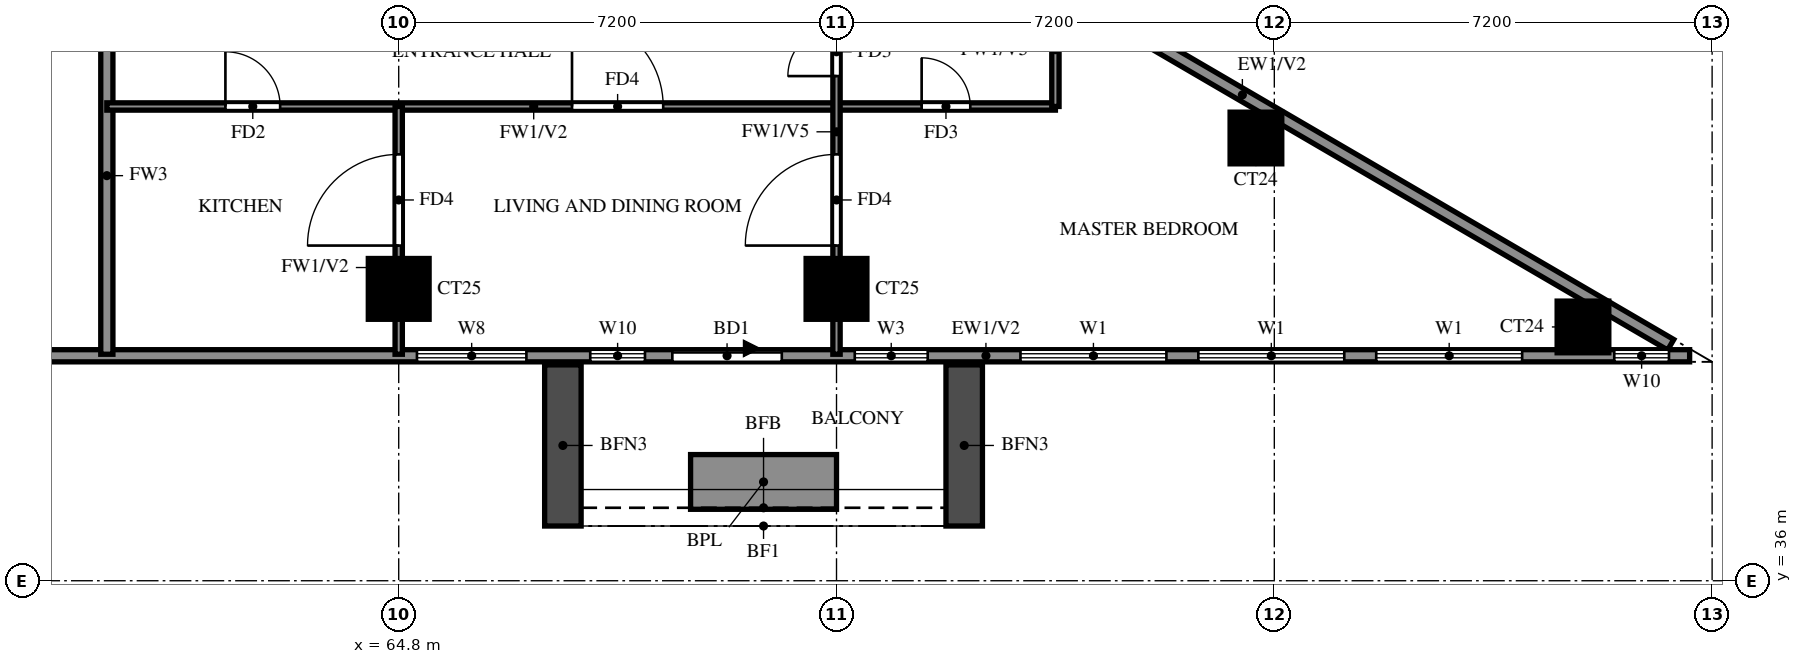
"""IFC4 building model, lengths in metres.
Left out: names, types, materials, properties, quantities, classifications, styles, units other than length and angle.
Written with IfcOpenShell. Run it as: python <this file> out.ifc"""

import sys

from ifc_helpers import new_model, si_unit, direction, frame, frame_2d, origin, origin_2d, place, context, subcontext, project, spatial, rectangle, extrude, source, transform, mapped, element, fill, save


model = new_model("IFC4")
c1 = context("Model", 3, precision=1e-05, world=origin(), true_north=direction((0.0, 1.0)))
c2 = subcontext(c1, "Body", "Model", "MODEL_VIEW")
j1 = project(units=[si_unit("LENGTHUNIT", "METRE"), si_unit("PLANEANGLEUNIT", "RADIAN")], contexts=[c1])
p1 = place(None, origin())
s1 = spatial("IfcSite", under=j1, at=p1, CompositionType="ELEMENT")
p2 = place(p1, origin())
s2 = spatial("IfcBuilding", under=s1, at=p2, CompositionType="ELEMENT")
p3 = place(p2, frame((0.0, 0.0, 143.0)))
s3 = spatial("IfcBuildingStorey", under=s2, at=p3, CompositionType="ELEMENT", Elevation=143.0)
m1 = source(origin(), c2, "Body", "SweptSolid", [
    extrude(rectangle(XDim=0.85, YDim=0.85, at=origin_2d()), origin(), (0.0, 0.0, 1.0), 3.2),
])
p4 = place(p3, frame((84.276, 40.174, 0.0), z_axis=(0.0, 0.0, 1.0), x_axis=(1.0, 0.0, 0.0)))
e1 = element("IfcColumn", 1, at=p4, inside=s3, PredefinedType="COLUMN", context=c2, shape_type="MappedRepresentation", body=[
    mapped(m1, transform((0.0, 0.0, 0.0))),
])
m2 = source(origin(), c2, "Body", "SweptSolid", [
    extrude(rectangle(XDim=1.0, YDim=1.0, at=origin_2d()), origin(), (0.0, 0.0, 1.0), 3.2),
])
for number, where, z_axis, x_axis in (
    (2, (64.8, 40.8, 0.0), (0.0, 0.0, 1.0), (1.0, 0.0, 0.0)),
    (3, (72.0, 40.8, 0.0), (0.0, 0.0, 1.0), (1.0, 0.0, 0.0)),
):
    element("IfcColumn", number, at=place(p3, frame(where, z_axis=z_axis, x_axis=x_axis)), inside=s3, PredefinedType="COLUMN", context=c2, shape_type="MappedRepresentation", body=[
        mapped(m2, transform((0.0, 0.0, 0.0))),
    ])
p5 = place(p3, frame((78.898, 43.282, 0.0), z_axis=(0.0, 0.0, 1.0), x_axis=(1.0, 0.0, 0.0)))
e4 = element("IfcColumn", 4, at=p5, inside=s3, PredefinedType="COLUMN", context=c2, shape_type="MappedRepresentation", body=[
    mapped(m1, transform((0.0, 0.0, 0.0))),
])
p6 = place(p3, frame((85.719, 39.881, 0.0), z_axis=(0.0, 0.0, 1.0), x_axis=(-0.86377618652, 0.503875678716, 0.0)))
e5 = element("IfcWall", 5, at=p6, inside=s3, PredefinedType="SOLIDWALL", context=c2, shape_type="SweptSolid", body=[
    extrude(rectangle(XDim=16.311, YDim=0.2, at=frame_2d((8.156, 0.0))), origin(), (0.0, 0.0, 1.0), 3.2),
])
p7 = place(p6, frame((13.326, 0.0, 1.5)))
e6 = element("IfcOpeningElement", 6, at=p7, cuts=e5, PredefinedType="OPENING", context=c2, shape_type="SweptSolid", body=[
    extrude(rectangle(XDim=0.9, YDim=0.9, at=frame_2d((0.45, 0.45))), frame((0.0, 0.11, 0.0), z_axis=(0.0, -1.0, 0.0), x_axis=(1.0, 0.0, 0.0)), (0.0, 0.0, 1.0), 0.22),
])
p8 = place(p3, frame((58.8, 39.7, 0.0), z_axis=(0.0, 0.0, 1.0), x_axis=(1.0, 0.0, 0.0)))
e7 = element("IfcWall", 7, at=p8, inside=s3, PredefinedType="SOLIDWALL", context=c2, shape_type="SweptSolid", body=[
    extrude(rectangle(XDim=27.23, YDim=0.2, at=frame_2d((13.615, 0.0))), origin(), (0.0, 0.0, 1.0), 3.2),
])
p9 = place(p8, frame((10.5, 0.0, 0.0)))
e8 = element("IfcOpeningElement", 8, at=p9, cuts=e7, PredefinedType="OPENING", context=c2, shape_type="SweptSolid", body=[
    extrude(rectangle(XDim=1.8, YDim=2.4, at=frame_2d((0.9, 1.2))), frame((0.0, 0.11, 0.0), z_axis=(0.0, -1.0, 0.0), x_axis=(1.0, 0.0, 0.0)), (0.0, 0.0, 1.0), 0.22),
])
p10 = place(p8, frame((6.3, 0.0, 0.6)))
e9 = element("IfcOpeningElement", 9, at=p10, cuts=e7, PredefinedType="OPENING", context=c2, shape_type="SweptSolid", body=[
    extrude(rectangle(XDim=1.8, YDim=2.4, at=frame_2d((0.9, 1.2))), frame((0.0, 0.11, 0.0), z_axis=(0.0, -1.0, 0.0), x_axis=(1.0, 0.0, 0.0)), (0.0, 0.0, 1.0), 0.22),
])
p11 = place(p8, frame((9.15, 0.0, 0.6)))
e10 = element("IfcOpeningElement", 10, at=p11, cuts=e7, PredefinedType="OPENING", context=c2, shape_type="SweptSolid", body=[
    extrude(rectangle(XDim=0.9, YDim=2.4, at=frame_2d((0.45, 1.2))), frame((0.0, 0.11, 0.0), z_axis=(0.0, -1.0, 0.0), x_axis=(1.0, 0.0, 0.0)), (0.0, 0.0, 1.0), 0.22),
])
p12 = place(p8, frame((13.5, 0.0, 0.6)))
e11 = element("IfcOpeningElement", 11, at=p12, cuts=e7, PredefinedType="OPENING", context=c2, shape_type="SweptSolid", body=[
    extrude(rectangle(XDim=1.2, YDim=2.4, at=frame_2d((0.6, 1.2))), frame((0.0, 0.11, 0.0), z_axis=(0.0, -1.0, 0.0), x_axis=(1.0, 0.0, 0.0)), (0.0, 0.0, 1.0), 0.22),
])
p13 = place(p8, frame((16.225, 0.0, 0.6)))
e12 = element("IfcOpeningElement", 12, at=p13, cuts=e7, PredefinedType="OPENING", context=c2, shape_type="SweptSolid", body=[
    extrude(rectangle(XDim=2.4, YDim=2.4, at=frame_2d((1.2, 1.2))), frame((0.0, 0.11, 0.0), z_axis=(0.0, -1.0, 0.0), x_axis=(1.0, 0.0, 0.0)), (0.0, 0.0, 1.0), 0.22),
])
p14 = place(p8, frame((19.151, 0.0, 0.6)))
e13 = element("IfcOpeningElement", 13, at=p14, cuts=e7, PredefinedType="OPENING", context=c2, shape_type="SweptSolid", body=[
    extrude(rectangle(XDim=2.4, YDim=2.4, at=frame_2d((1.2, 1.2))), frame((0.0, 0.11, 0.0), z_axis=(0.0, -1.0, 0.0), x_axis=(1.0, 0.0, 0.0)), (0.0, 0.0, 1.0), 0.22),
])
p15 = place(p8, frame((22.076, 0.0, 0.6)))
e14 = element("IfcOpeningElement", 14, at=p15, cuts=e7, PredefinedType="OPENING", context=c2, shape_type="SweptSolid", body=[
    extrude(rectangle(XDim=2.4, YDim=2.4, at=frame_2d((1.2, 1.2))), frame((0.0, 0.11, 0.0), z_axis=(0.0, -1.0, 0.0), x_axis=(1.0, 0.0, 0.0)), (0.0, 0.0, 1.0), 0.22),
])
p16 = place(p8, frame((25.99, 0.0, 0.6)))
e15 = element("IfcOpeningElement", 15, at=p16, cuts=e7, PredefinedType="OPENING", context=c2, shape_type="SweptSolid", body=[
    extrude(rectangle(XDim=0.9, YDim=2.4, at=frame_2d((0.45, 1.2))), frame((0.0, 0.11, 0.0), z_axis=(0.0, -1.0, 0.0), x_axis=(1.0, 0.0, 0.0)), (0.0, 0.0, 1.0), 0.22),
])
for number, where, z_axis, x_axis in (
    (16, (67.5, 39.55, 0.0), (0.0, 0.0, 1.0), (0.0, -1.0, 0.0)),
    (17, (74.1, 39.55, 0.0), (0.0, 0.0, 1.0), (0.0, -1.0, 0.0)),
):
    element("IfcWall", number, at=place(p3, frame(where, z_axis=z_axis, x_axis=x_axis)), inside=s3, PredefinedType="SOLIDWALL", context=c2, shape_type="SweptSolid", body=[
        extrude(rectangle(XDim=2.65, YDim=0.6, at=frame_2d((1.325, 0.0))), origin(), (0.0, 0.0, 1.0), 2.85),
    ])
p17 = place(p3, frame((69.6, 37.625, 0.0), z_axis=(0.0, 0.0, 1.0), x_axis=(1.0, 0.0, 0.0)))
e18 = element("IfcWall", 18, at=p17, inside=s3, PredefinedType="SOLIDWALL", context=c2, shape_type="SweptSolid", body=[
    extrude(rectangle(XDim=2.4, YDim=0.9, at=frame_2d((1.2, 0.0))), origin(), (0.0, 0.0, 1.0), 0.9),
])
p18 = place(p3, frame((60.0, 39.725, 0.0), z_axis=(0.0, 0.0, 1.0), x_axis=(0.0, 1.0, 0.0)))
e19 = element("IfcWall", 19, at=p18, inside=s3, PredefinedType="SOLIDWALL", context=c2, shape_type="SweptSolid", body=[
    extrude(rectangle(XDim=5.875, YDim=0.2, at=frame_2d((2.938, 0.0))), origin(), (0.0, 0.0, 1.0), 3.2),
])
p19 = place(p3, frame((60.0, 43.8, 0.0), z_axis=(0.0, 0.0, 1.0), x_axis=(1.0, 0.0, 0.0)))
e20 = element("IfcWall", 20, at=p19, inside=s3, PredefinedType="PARTITIONING", context=c2, shape_type="SweptSolid", body=[
    extrude(rectangle(XDim=15.6, YDim=0.12, at=frame_2d((7.8, 0.0))), origin(), (0.0, 0.0, 1.0), 3.2),
])
p20 = place(p19, frame((7.65, 0.0, 0.0)))
e21 = element("IfcOpeningElement", 21, at=p20, cuts=e20, PredefinedType="OPENING", context=c2, shape_type="SweptSolid", body=[
    extrude(rectangle(XDim=1.5, YDim=2.1, at=frame_2d((0.75, 1.05))), frame((0.0, 0.07, 0.0), z_axis=(0.0, -1.0, 0.0), x_axis=(1.0, 0.0, 0.0)), (0.0, 0.0, 1.0), 0.14),
])
p21 = place(p19, frame((1.95, 0.0, 0.0)))
e22 = element("IfcOpeningElement", 22, at=p21, cuts=e20, PredefinedType="OPENING", context=c2, shape_type="SweptSolid", body=[
    extrude(rectangle(XDim=0.9, YDim=2.1, at=frame_2d((0.45, 1.05))), frame((0.0, 0.07, 0.0), z_axis=(0.0, -1.0, 0.0), x_axis=(1.0, 0.0, 0.0)), (0.0, 0.0, 1.0), 0.14),
])
p22 = place(p19, frame((13.4, 0.0, 0.0)))
e23 = element("IfcOpeningElement", 23, at=p22, cuts=e20, PredefinedType="OPENING", context=c2, shape_type="SweptSolid", body=[
    extrude(rectangle(XDim=0.8, YDim=2.1, at=frame_2d((0.4, 1.05))), frame((0.0, 0.07, 0.0), z_axis=(0.0, -1.0, 0.0), x_axis=(1.0, 0.0, 0.0)), (0.0, 0.0, 1.0), 0.14),
])
p23 = place(p3, frame((64.8, 39.725, 0.0), z_axis=(0.0, 0.0, 1.0), x_axis=(0.0, 1.0, 0.0)))
e24 = element("IfcWall", 24, at=p23, inside=s3, PredefinedType="PARTITIONING", context=c2, shape_type="SweptSolid", body=[
    extrude(rectangle(XDim=4.075, YDim=0.12, at=frame_2d((2.038, 0.0))), origin(), (0.0, 0.0, 1.0), 3.2),
])
p24 = place(p23, frame((1.788, 0.0, 0.0)))
e25 = element("IfcOpeningElement", 25, at=p24, cuts=e24, PredefinedType="OPENING", context=c2, shape_type="SweptSolid", body=[
    extrude(rectangle(XDim=1.5, YDim=2.1, at=frame_2d((0.75, 1.05))), frame((0.0, 0.07, 0.0), z_axis=(0.0, -1.0, 0.0), x_axis=(1.0, 0.0, 0.0)), (0.0, 0.0, 1.0), 0.14),
])
p25 = place(p3, frame((72.0, 39.725, 0.0), z_axis=(0.0, 0.0, 1.0), x_axis=(0.0, 1.0, 0.0)))
e26 = element("IfcWall", 26, at=p25, inside=s3, PredefinedType="PARTITIONING", context=c2, shape_type="SweptSolid", body=[
    extrude(rectangle(XDim=8.13, YDim=0.12, at=frame_2d((4.065, 0.0))), origin(), (0.0, 0.0, 1.0), 2.3),
])
p26 = place(p25, frame((1.788, 0.0, 0.0)))
e27 = element("IfcOpeningElement", 27, at=p26, cuts=e26, PredefinedType="OPENING", context=c2, shape_type="SweptSolid", body=[
    extrude(rectangle(XDim=1.5, YDim=2.1, at=frame_2d((0.75, 1.05))), frame((0.0, 0.07, 0.0), z_axis=(0.0, -1.0, 0.0), x_axis=(1.0, 0.0, 0.0)), (0.0, 0.0, 1.0), 0.14),
])
p27 = place(p25, frame((4.575, 0.0, 0.0)))
e28 = element("IfcOpeningElement", 28, at=p27, cuts=e26, PredefinedType="OPENING", context=c2, shape_type="SweptSolid", body=[
    extrude(rectangle(XDim=0.8, YDim=2.1, at=frame_2d((0.4, 1.05))), frame((0.0, 0.07, 0.0), z_axis=(0.0, -1.0, 0.0), x_axis=(1.0, 0.0, 0.0)), (0.0, 0.0, 1.0), 0.14),
])
p28 = place(p3, frame((75.6, 43.8, 0.0), z_axis=(0.0, 0.0, 1.0), x_axis=(0.0, 1.0, 0.0)))
e29 = element("IfcWall", 29, at=p28, inside=s3, PredefinedType="PARTITIONING", context=c2, shape_type="SweptSolid", body=[
    extrude(rectangle(XDim=1.868, YDim=0.12, at=frame_2d((0.934, 0.0))), origin(), (0.0, 0.0, 1.0), 2.3),
])
p29 = place(p9, origin())
e30 = element("IfcDoor", 30, at=p29, inside=s3, OperationType="DOUBLE_DOOR_SLIDING", PredefinedType="DOOR", context=c2, shape_type="SweptSolid", body=[
    extrude(rectangle(XDim=1.8, YDim=2.4, at=frame_2d((0.9, 1.2))), frame((0.0, 0.025, 0.0), z_axis=(0.0, -1.0, 0.0), x_axis=(1.0, 0.0, 0.0)), (0.0, 0.0, 1.0), 0.05),
])
fill(e8, e30)
p30 = place(p10, origin())
e31 = element("IfcWindow", 31, at=p30, inside=s3, PartitioningType="DOUBLE_PANEL_VERTICAL", PredefinedType="WINDOW", context=c2, shape_type="SweptSolid", body=[
    extrude(rectangle(XDim=1.8, YDim=2.4, at=frame_2d((0.9, 1.2))), frame((0.0, 0.03, 0.0), z_axis=(0.0, -1.0, 0.0), x_axis=(1.0, 0.0, 0.0)), (0.0, 0.0, 1.0), 0.06),
])
fill(e9, e31)
p31 = place(p11, origin())
e32 = element("IfcWindow", 32, at=p31, inside=s3, PartitioningType="SINGLE_PANEL", PredefinedType="WINDOW", context=c2, shape_type="SweptSolid", body=[
    extrude(rectangle(XDim=0.9, YDim=2.4, at=frame_2d((0.45, 1.2))), frame((0.0, 0.03, 0.0), z_axis=(0.0, -1.0, 0.0), x_axis=(1.0, 0.0, 0.0)), (0.0, 0.0, 1.0), 0.06),
])
fill(e10, e32)
p32 = place(p12, origin())
e33 = element("IfcWindow", 33, at=p32, inside=s3, PartitioningType="SINGLE_PANEL", PredefinedType="WINDOW", context=c2, shape_type="SweptSolid", body=[
    extrude(rectangle(XDim=1.2, YDim=2.4, at=frame_2d((0.6, 1.2))), frame((0.0, 0.03, 0.0), z_axis=(0.0, -1.0, 0.0), x_axis=(1.0, 0.0, 0.0)), (0.0, 0.0, 1.0), 0.06),
])
fill(e11, e33)
p33 = place(p13, origin())
e34 = element("IfcWindow", 34, at=p33, inside=s3, PartitioningType="DOUBLE_PANEL_VERTICAL", PredefinedType="WINDOW", context=c2, shape_type="SweptSolid", body=[
    extrude(rectangle(XDim=2.4, YDim=2.4, at=frame_2d((1.2, 1.2))), frame((0.0, 0.03, 0.0), z_axis=(0.0, -1.0, 0.0), x_axis=(1.0, 0.0, 0.0)), (0.0, 0.0, 1.0), 0.06),
])
fill(e12, e34)
p34 = place(p14, origin())
e35 = element("IfcWindow", 35, at=p34, inside=s3, PartitioningType="DOUBLE_PANEL_VERTICAL", PredefinedType="WINDOW", context=c2, shape_type="SweptSolid", body=[
    extrude(rectangle(XDim=2.4, YDim=2.4, at=frame_2d((1.2, 1.2))), frame((0.0, 0.03, 0.0), z_axis=(0.0, -1.0, 0.0), x_axis=(1.0, 0.0, 0.0)), (0.0, 0.0, 1.0), 0.06),
])
fill(e13, e35)
p35 = place(p15, origin())
e36 = element("IfcWindow", 36, at=p35, inside=s3, PartitioningType="DOUBLE_PANEL_VERTICAL", PredefinedType="WINDOW", context=c2, shape_type="SweptSolid", body=[
    extrude(rectangle(XDim=2.4, YDim=2.4, at=frame_2d((1.2, 1.2))), frame((0.0, 0.03, 0.0), z_axis=(0.0, -1.0, 0.0), x_axis=(1.0, 0.0, 0.0)), (0.0, 0.0, 1.0), 0.06),
])
fill(e14, e36)
p36 = place(p16, origin())
e37 = element("IfcWindow", 37, at=p36, inside=s3, PartitioningType="SINGLE_PANEL", PredefinedType="WINDOW", context=c2, shape_type="SweptSolid", body=[
    extrude(rectangle(XDim=0.9, YDim=2.4, at=frame_2d((0.45, 1.2))), frame((0.0, 0.03, 0.0), z_axis=(0.0, -1.0, 0.0), x_axis=(1.0, 0.0, 0.0)), (0.0, 0.0, 1.0), 0.06),
])
fill(e15, e37)
p37 = place(p24, origin())
e38 = element("IfcDoor", 38, at=p37, inside=s3, OperationType="SINGLE_SWING_RIGHT", PredefinedType="DOOR", context=c2, shape_type="SweptSolid", body=[
    extrude(rectangle(XDim=1.5, YDim=2.1, at=frame_2d((0.75, 1.05))), frame((0.0, 0.025, 0.0), z_axis=(0.0, -1.0, 0.0), x_axis=(1.0, 0.0, 0.0)), (0.0, 0.0, 1.0), 0.05),
])
fill(e25, e38)
p38 = place(p20, origin())
e39 = element("IfcDoor", 39, at=p38, inside=s3, OperationType="SINGLE_SWING_LEFT", PredefinedType="DOOR", context=c2, shape_type="SweptSolid", body=[
    extrude(rectangle(XDim=1.5, YDim=2.1, at=frame_2d((0.75, 1.05))), frame((0.0, 0.025, 0.0), z_axis=(0.0, -1.0, 0.0), x_axis=(1.0, 0.0, 0.0)), (0.0, 0.0, 1.0), 0.05),
])
fill(e21, e39)
p39 = place(p21, origin())
e40 = element("IfcDoor", 40, at=p39, inside=s3, OperationType="SINGLE_SWING_RIGHT", PredefinedType="DOOR", context=c2, shape_type="SweptSolid", body=[
    extrude(rectangle(XDim=0.9, YDim=2.1, at=frame_2d((0.45, 1.05))), frame((0.0, 0.025, 0.0), z_axis=(0.0, -1.0, 0.0), x_axis=(1.0, 0.0, 0.0)), (0.0, 0.0, 1.0), 0.05),
])
fill(e22, e40)
p40 = place(p26, origin())
e41 = element("IfcDoor", 41, at=p40, inside=s3, OperationType="SINGLE_SWING_RIGHT", PredefinedType="DOOR", context=c2, shape_type="SweptSolid", body=[
    extrude(rectangle(XDim=1.5, YDim=2.1, at=frame_2d((0.75, 1.05))), frame((0.0, 0.025, 0.0), z_axis=(0.0, -1.0, 0.0), x_axis=(1.0, 0.0, 0.0)), (0.0, 0.0, 1.0), 0.05),
])
fill(e27, e41)
p41 = place(p27, origin())
e42 = element("IfcDoor", 42, at=p41, inside=s3, OperationType="SINGLE_SWING_LEFT", PredefinedType="DOOR", context=c2, shape_type="SweptSolid", body=[
    extrude(rectangle(XDim=0.8, YDim=2.1, at=frame_2d((0.4, 1.05))), frame((0.0, 0.025, 0.0), z_axis=(0.0, -1.0, 0.0), x_axis=(1.0, 0.0, 0.0)), (0.0, 0.0, 1.0), 0.05),
])
fill(e28, e42)
p42 = place(p22, origin())
e43 = element("IfcDoor", 43, at=p42, inside=s3, OperationType="SINGLE_SWING_RIGHT", PredefinedType="DOOR", context=c2, shape_type="SweptSolid", body=[
    extrude(rectangle(XDim=0.8, YDim=2.1, at=frame_2d((0.4, 1.05))), frame((0.0, 0.025, 0.0), z_axis=(0.0, -1.0, 0.0), x_axis=(1.0, 0.0, 0.0)), (0.0, 0.0, 1.0), 0.05),
])
fill(e23, e43)
save(model, sys.argv[1])
